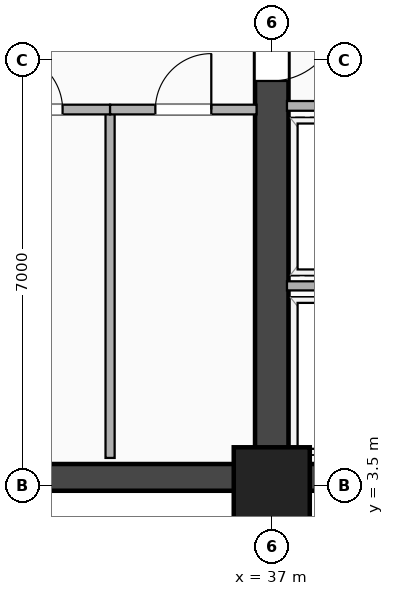
"""IFC4 building model, lengths in metres.
Left out: names, types, materials, properties, quantities, classifications, styles, units other than length and angle.
Written with IfcOpenShell. Run it as: python <this file> out.ifc"""

import sys

from ifc_helpers import new_model, si_unit, direction, frame, frame_2d, origin, origin_2d, place, context, subcontext, project, spatial, rectangle, extrude, element, fill, save


model = new_model("IFC4")
c1 = context("Model", 3, precision=1e-05, world=origin(), true_north=direction((0.0, 1.0)))
c2 = subcontext(c1, "Body", "Model", "MODEL_VIEW")
j1 = project(units=[si_unit("LENGTHUNIT", "METRE"), si_unit("PLANEANGLEUNIT", "RADIAN")], contexts=[c1])
p1 = place(None, origin())
s1 = spatial("IfcSite", under=j1, at=p1, CompositionType="ELEMENT")
p2 = place(p1, origin())
s2 = spatial("IfcBuilding", under=s1, at=p2, CompositionType="ELEMENT")
p3 = place(p2, frame((0.0, 0.0, 98.7)))
s3 = spatial("IfcBuildingStorey", under=s2, at=p3, CompositionType="ELEMENT", Elevation=98.7)
p4 = place(p3, frame((20.3, 3.63, 0.0), z_axis=(0.0, 0.0, 1.0), x_axis=(1.0, 0.0, 0.0)))
e1 = element("IfcWall", 1, at=p4, inside=s3, PredefinedType="SHEAR", context=c2, shape_type="SweptSolid", body=[
    extrude(rectangle(XDim=24.5, YDim=0.44, at=frame_2d((12.25, 0.0))), origin(), (0.0, 0.0, 1.0), 3.24),
])
p5 = place(p3, frame((37.0, 3.5, 0.0), z_axis=(0.0, 0.0, 1.0), x_axis=(0.0, 1.0, 0.0)))
e2 = element("IfcWall", 2, at=p5, inside=s3, PredefinedType="SHEAR", context=c2, shape_type="SweptSolid", body=[
    extrude(rectangle(XDim=16.9, YDim=0.55, at=frame_2d((8.45, 0.0))), origin(), (0.0, 0.0, 1.0), 3.24),
])
p6 = place(p5, frame((6.65, 0.0, 0.0)))
e3 = element("IfcOpeningElement", 3, at=p6, cuts=e2, PredefinedType="OPENING", context=c2, shape_type="SweptSolid", body=[
    extrude(rectangle(XDim=1.1, YDim=2.15, at=frame_2d((0.55, 1.075))), frame((0.0, 0.285, 0.0), z_axis=(0.0, -1.0, 0.0), x_axis=(1.0, 0.0, 0.0)), (0.0, 0.0, 1.0), 0.57),
])
p7 = place(p3, frame((37.0, 3.5, -0.26), z_axis=(0.0, 0.0, 1.0), x_axis=(1.0, 0.0, 0.0)))
e4 = element("IfcColumn", 4, at=p7, inside=s3, PredefinedType="COLUMN", context=c2, shape_type="SweptSolid", body=[
    extrude(rectangle(XDim=1.25, YDim=1.25, at=origin_2d()), origin(), (0.0, 0.0, 1.0), 3.5),
])
p8 = place(p3, frame((37.25, 6.78, 0.0), z_axis=(0.0, 0.0, 1.0), x_axis=(1.0, 0.0, 0.0)))
e5 = element("IfcWall", 5, at=p8, inside=s3, PredefinedType="PARTITIONING", context=c2, shape_type="SweptSolid", body=[
    extrude(rectangle(XDim=2.17, YDim=0.15, at=frame_2d((1.085, 0.0))), origin(), (0.0, 0.0, 1.0), 3.24),
])
p9 = place(p3, frame((37.25, 9.74, 0.0), z_axis=(0.0, 0.0, 1.0), x_axis=(1.0, 0.0, 0.0)))
e6 = element("IfcWall", 6, at=p9, inside=s3, PredefinedType="PARTITIONING", context=c2, shape_type="SweptSolid", body=[
    extrude(rectangle(XDim=2.17, YDim=0.16, at=frame_2d((1.085, 0.0))), origin(), (0.0, 0.0, 1.0), 3.24),
])
p10 = place(p3, frame((34.341, 3.95, 0.0), z_axis=(0.0, 0.0, 1.0), x_axis=(0.0, 1.0, 0.0)))
e7 = element("IfcWall", 7, at=p10, inside=s3, PredefinedType="PARTITIONING", context=c2, shape_type="SweptSolid", body=[
    extrude(rectangle(XDim=5.73, YDim=0.15, at=frame_2d((2.865, 0.0))), origin(), (0.0, 0.0, 1.0), 3.24),
])
p11 = place(p3, frame((31.859, 9.68, 0.0), z_axis=(0.0, 0.0, 1.0), x_axis=(1.0, 0.0, 0.0)))
e8 = element("IfcWall", 8, at=p11, inside=s3, PredefinedType="PARTITIONING", context=c2, shape_type="SweptSolid", body=[
    extrude(rectangle(XDim=2.482, YDim=0.16, at=frame_2d((1.241, 0.0))), origin(), (0.0, 0.0, 1.0), 3.24),
])
p12 = place(p11, frame((1.701, 0.0, 0.0), z_axis=(0.0, 0.0, 1.0), x_axis=(-1.0, 0.0, 0.0)))
e9 = element("IfcOpeningElement", 9, at=p12, cuts=e8, PredefinedType="OPENING", context=c2, shape_type="SweptSolid", body=[
    extrude(rectangle(XDim=0.92, YDim=2.08, at=frame_2d((0.46, 1.04))), frame((0.0, 0.09, 0.0), z_axis=(0.0, -1.0, 0.0), x_axis=(1.0, 0.0, 0.0)), (0.0, 0.0, 1.0), 0.18),
])
p13 = place(p3, frame((34.341, 9.68, 0.0), z_axis=(0.0, 0.0, 1.0), x_axis=(1.0, 0.0, 0.0)))
e10 = element("IfcWall", 10, at=p13, inside=s3, PredefinedType="PARTITIONING", context=c2, shape_type="SweptSolid", body=[
    extrude(rectangle(XDim=2.409, YDim=0.16, at=frame_2d((1.205, 0.0))), origin(), (0.0, 0.0, 1.0), 3.24),
])
p14 = place(p13, frame((1.664, 0.0, 0.0), z_axis=(0.0, 0.0, 1.0), x_axis=(-1.0, 0.0, 0.0)))
e11 = element("IfcOpeningElement", 11, at=p14, cuts=e10, PredefinedType="OPENING", context=c2, shape_type="SweptSolid", body=[
    extrude(rectangle(XDim=0.92, YDim=2.08, at=frame_2d((0.46, 1.04))), frame((0.0, 0.09, 0.0), z_axis=(0.0, -1.0, 0.0), x_axis=(1.0, 0.0, 0.0)), (0.0, 0.0, 1.0), 0.18),
])
p15 = place(p6, origin())
e12 = element("IfcDoor", 12, at=p15, inside=s3, OperationType="SINGLE_SWING_RIGHT", PredefinedType="DOOR", context=c2, shape_type="SweptSolid", body=[
    extrude(rectangle(XDim=1.1, YDim=2.15, at=frame_2d((0.55, 1.075))), frame((0.0, 0.025, 0.0), z_axis=(0.0, -1.0, 0.0), x_axis=(1.0, 0.0, 0.0)), (0.0, 0.0, 1.0), 0.05),
])
fill(e3, e12)
p16 = place(p12, origin())
e13 = element("IfcDoor", 13, at=p16, inside=s3, OperationType="SINGLE_SWING_LEFT", PredefinedType="DOOR", context=c2, shape_type="SweptSolid", body=[
    extrude(rectangle(XDim=0.92, YDim=2.08, at=frame_2d((0.46, 1.04))), frame((0.0, 0.025, 0.0), z_axis=(0.0, -1.0, 0.0), x_axis=(1.0, 0.0, 0.0)), (0.0, 0.0, 1.0), 0.05),
])
fill(e9, e13)
p17 = place(p14, origin())
e14 = element("IfcDoor", 14, at=p17, inside=s3, OperationType="SINGLE_SWING_RIGHT", PredefinedType="DOOR", context=c2, shape_type="SweptSolid", body=[
    extrude(rectangle(XDim=0.92, YDim=2.08, at=frame_2d((0.46, 1.04))), frame((0.0, 0.025, 0.0), z_axis=(0.0, -1.0, 0.0), x_axis=(1.0, 0.0, 0.0)), (0.0, 0.0, 1.0), 0.05),
])
fill(e11, e14)
save(model, sys.argv[1])
